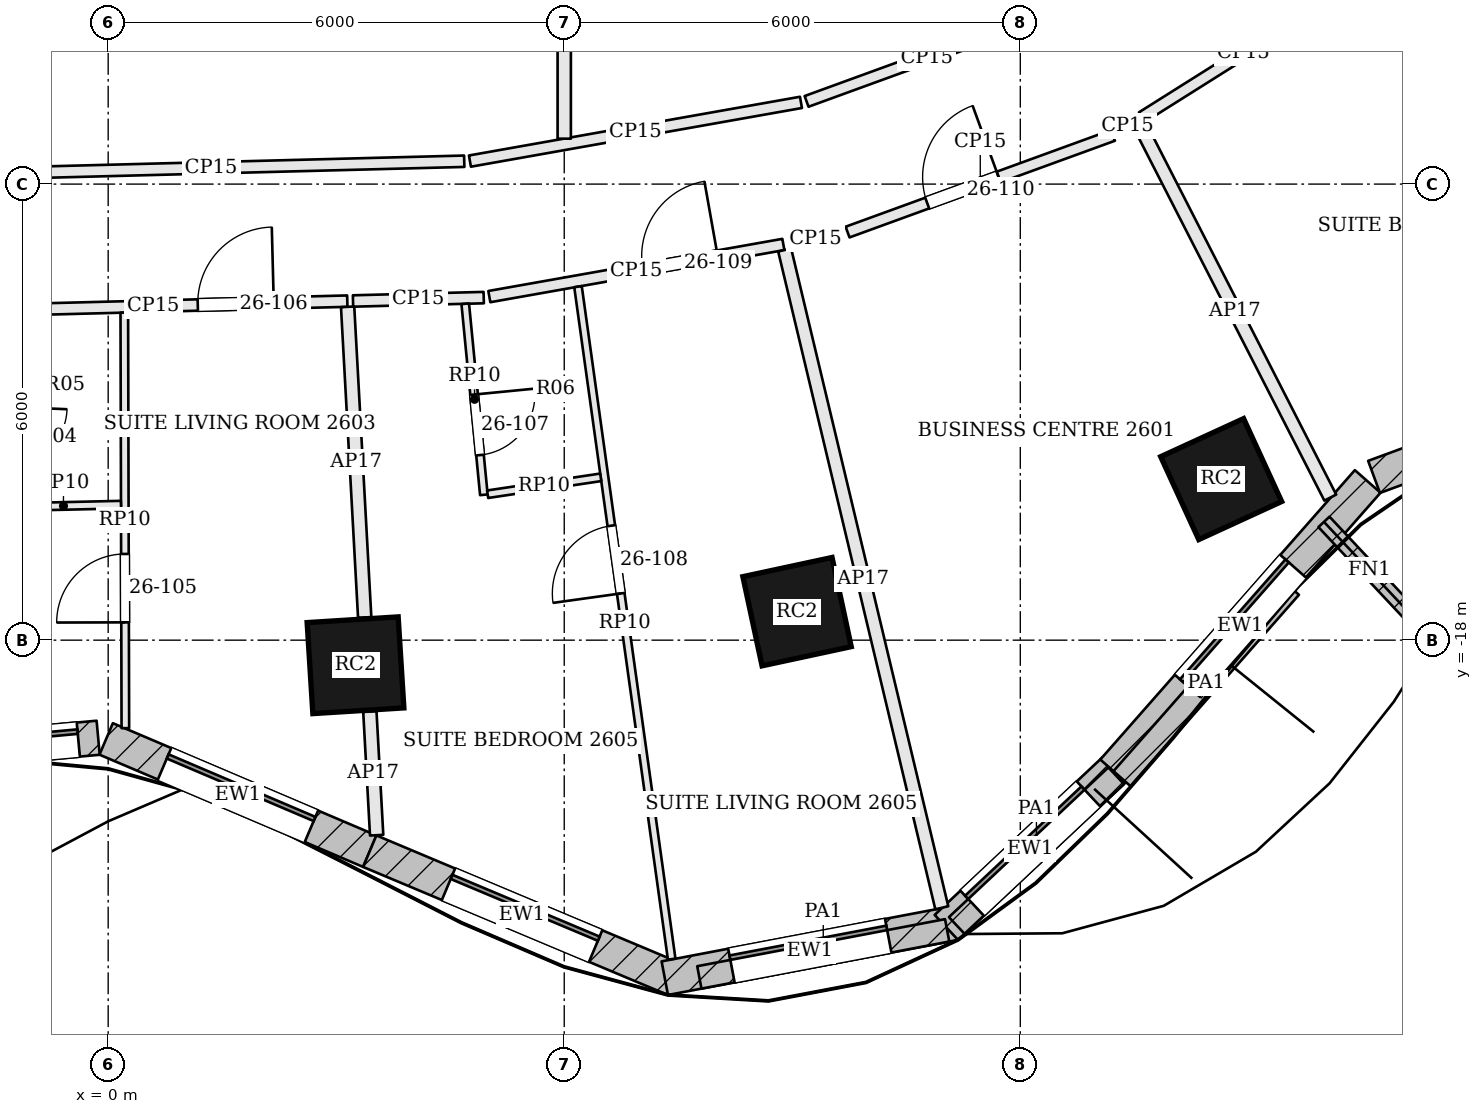
"""IFC4 building model, lengths in metres.
Left out: names, types, materials, properties, quantities, classifications, styles, units other than length and angle.
Written with IfcOpenShell. Run it as: python <this file> out.ifc"""

import sys

from ifc_helpers import new_model, si_unit, direction, frame, frame_2d, origin, origin_2d, place, context, subcontext, project, spatial, rectangle, extrude, element, fill, save


model = new_model("IFC4")
c1 = context("Model", 3, precision=1e-05, world=origin(), true_north=direction((0.0, 1.0)))
c2 = subcontext(c1, "Body", "Model", "MODEL_VIEW")
j1 = project(units=[si_unit("LENGTHUNIT", "METRE"), si_unit("PLANEANGLEUNIT", "RADIAN")], contexts=[c1])
p1 = place(None, origin())
s1 = spatial("IfcSite", under=j1, at=p1, CompositionType="ELEMENT")
p2 = place(p1, origin())
s2 = spatial("IfcBuilding", under=s1, at=p2, CompositionType="ELEMENT")
p3 = place(p2, frame((0.0, 0.0, 110.4)))
s3 = spatial("IfcBuildingStorey", under=s2, at=p3, CompositionType="ELEMENT", Elevation=110.4)
for number, where, z_axis, x_axis in (
    (1, (3.254, -18.33, 0.0), (0.0, 0.0, 1.0), (0.998, 0.063, 0.0)),
    (2, (9.063, -17.625, 0.0), (0.0, 0.0, 1.0), (0.978, 0.21, 0.0)),
    (3, (14.643, -15.881, 0.0), (0.0, 0.0, 1.0), (0.909, 0.417, 0.0)),
):
    element("IfcColumn", number, at=place(p3, frame(where, z_axis=z_axis, x_axis=x_axis)), inside=s3, PredefinedType="COLUMN", context=c2, shape_type="SweptSolid", body=[
        extrude(rectangle(XDim=1.2, YDim=1.2, at=origin_2d()), origin(), (0.0, 0.0, 1.0), 3.6),
    ])
p4 = place(p3, frame((-2.745, -19.525, 0.0), z_axis=(0.0, 0.0, 1.0), x_axis=(0.995768774275, 0.091894222771, 0.0)))
e4 = element("IfcWall", 4, at=p4, inside=s3, PredefinedType="SOLIDWALL", context=c2, shape_type="SweptSolid", body=[
    extrude(rectangle(XDim=2.625, YDim=0.45, at=frame_2d((1.312, 0.0))), origin(), (0.0, 0.0, 1.0), 3.4),
])
p5 = place(p4, frame((0.262, 0.0, 0.9)))
e5 = element("IfcOpeningElement", 5, at=p5, cuts=e4, PredefinedType="OPENING", context=c2, shape_type="SweptSolid", body=[
    extrude(rectangle(XDim=2.1, YDim=2.0, at=frame_2d((1.05, 1.0))), frame((0.0, 0.235, 0.0), z_axis=(0.0, -1.0, 0.0), x_axis=(1.0, 0.0, 0.0)), (0.0, 0.0, 1.0), 0.47),
])
p6 = place(p3, frame((-0.026, -19.299, 0.0), z_axis=(0.0, 0.0, 1.0), x_axis=(0.920040408927, -0.391823488245, 0.0)))
e6 = element("IfcWall", 6, at=p6, inside=s3, PredefinedType="SOLIDWALL", context=c2, shape_type="SweptSolid", body=[
    extrude(rectangle(XDim=3.77, YDim=0.45, at=frame_2d((1.885, 0.0))), origin(), (0.0, 0.0, 1.0), 3.4),
])
p7 = place(p6, frame((0.835, 0.0, 0.9)))
e7 = element("IfcOpeningElement", 7, at=p7, cuts=e6, PredefinedType="OPENING", context=c2, shape_type="SweptSolid", body=[
    extrude(rectangle(XDim=2.1, YDim=2.0, at=frame_2d((1.05, 1.0))), frame((0.0, 0.235, 0.0), z_axis=(0.0, -1.0, 0.0), x_axis=(1.0, 0.0, 0.0)), (0.0, 0.0, 1.0), 0.47),
])
p8 = place(p3, frame((3.441, -20.776, 0.0), z_axis=(0.0, 0.0, 1.0), x_axis=(0.921988121387, -0.387218160758, 0.0)))
e8 = element("IfcWall", 8, at=p8, inside=s3, PredefinedType="SOLIDWALL", context=c2, shape_type="SweptSolid", body=[
    extrude(rectangle(XDim=4.347, YDim=0.45, at=frame_2d((2.173, 0.0))), origin(), (0.0, 0.0, 1.0), 3.4),
])
p9 = place(p8, frame((1.123, 0.0, 0.9)))
e9 = element("IfcOpeningElement", 9, at=p9, cuts=e8, PredefinedType="OPENING", context=c2, shape_type="SweptSolid", body=[
    extrude(rectangle(XDim=2.1, YDim=2.0, at=frame_2d((1.05, 1.0))), frame((0.0, 0.235, 0.0), z_axis=(0.0, -1.0, 0.0), x_axis=(1.0, 0.0, 0.0)), (0.0, 0.0, 1.0), 0.47),
])
p10 = place(p3, frame((7.323, -22.447, 0.0), z_axis=(0.0, 0.0, 1.0), x_axis=(0.982420993638, 0.18667884524, 0.0)))
e10 = element("IfcWall", 10, at=p10, inside=s3, PredefinedType="SOLIDWALL", context=c2, shape_type="SweptSolid", body=[
    extrude(rectangle(XDim=3.884, YDim=0.45, at=frame_2d((1.942, 0.0))), origin(), (0.0, 0.0, 1.0), 3.4),
])
p11 = place(p10, frame((0.892, 0.0, 0.9)))
e11 = element("IfcOpeningElement", 11, at=p11, cuts=e10, PredefinedType="OPENING", context=c2, shape_type="SweptSolid", body=[
    extrude(rectangle(XDim=2.1, YDim=2.0, at=frame_2d((1.05, 1.0))), frame((0.0, 0.235, 0.0), z_axis=(0.0, -1.0, 0.0), x_axis=(1.0, 0.0, 0.0)), (0.0, 0.0, 1.0), 0.47),
])
p12 = place(p3, frame((11.027, -21.779, 0.0), z_axis=(0.0, 0.0, 1.0), x_axis=(0.728871214251, 0.684650825631, 0.0)))
e12 = element("IfcWall", 12, at=p12, inside=s3, PredefinedType="SOLIDWALL", context=c2, shape_type="SweptSolid", body=[
    extrude(rectangle(XDim=3.031, YDim=0.45, at=frame_2d((1.516, 0.0))), origin(), (0.0, 0.0, 1.0), 3.4),
])
p13 = place(p12, frame((0.466, 0.0, 0.9)))
e13 = element("IfcOpeningElement", 13, at=p13, cuts=e12, PredefinedType="OPENING", context=c2, shape_type="SweptSolid", body=[
    extrude(rectangle(XDim=2.1, YDim=2.0, at=frame_2d((1.05, 1.0))), frame((0.0, 0.235, 0.0), z_axis=(0.0, -1.0, 0.0), x_axis=(1.0, 0.0, 0.0)), (0.0, 0.0, 1.0), 0.47),
])
p14 = place(p3, frame((13.221, -19.719, 0.0), z_axis=(0.0, 0.0, 1.0), x_axis=(0.660424908916, 0.750892095899, 0.0)))
e14 = element("IfcWall", 14, at=p14, inside=s3, PredefinedType="SOLIDWALL", context=c2, shape_type="SweptSolid", body=[
    extrude(rectangle(XDim=5.071, YDim=0.45, at=frame_2d((2.535, 0.0))), origin(), (0.0, 0.0, 1.0), 3.4),
])
p15 = place(p14, frame((1.485, 0.0, 0.9)))
e15 = element("IfcOpeningElement", 15, at=p15, cuts=e14, PredefinedType="OPENING", context=c2, shape_type="SweptSolid", body=[
    extrude(rectangle(XDim=2.1, YDim=2.0, at=frame_2d((1.05, 1.0))), frame((0.0, 0.235, 0.0), z_axis=(0.0, -1.0, 0.0), x_axis=(1.0, 0.0, 0.0)), (0.0, 0.0, 1.0), 0.47),
])
p16 = place(p3, frame((16.654, -15.852, 0.0), z_axis=(0.0, 0.0, 1.0), x_axis=(0.938636568132, 0.344907803572, 0.0)))
e16 = element("IfcWall", 16, at=p16, inside=s3, PredefinedType="SOLIDWALL", context=c2, shape_type="SweptSolid", body=[
    extrude(rectangle(XDim=3.887, YDim=0.45, at=frame_2d((1.944, 0.0))), origin(), (0.0, 0.0, 1.0), 3.4),
])
p17 = place(p16, frame((0.894, 0.0, 0.9)))
e17 = element("IfcOpeningElement", 17, at=p17, cuts=e16, PredefinedType="OPENING", context=c2, shape_type="SweptSolid", body=[
    extrude(rectangle(XDim=2.1, YDim=2.0, at=frame_2d((1.05, 1.0))), frame((0.0, 0.235, 0.0), z_axis=(0.0, -1.0, 0.0), x_axis=(1.0, 0.0, 0.0)), (0.0, 0.0, 1.0), 0.47),
])
p18 = place(p3, frame((15.995, -16.444, 0.0), z_axis=(0.0, 0.0, 1.0), x_axis=(0.683852936488, -0.729619874494, 0.0)))
e18 = element("IfcWall", 18, at=p18, inside=s3, PredefinedType="SOLIDWALL", context=c2, shape_type="SweptSolid", body=[
    extrude(rectangle(XDim=1.75, YDim=0.2, at=frame_2d((0.875, 0.0))), origin(), (0.0, 0.0, 1.0), 3.4),
])
p19 = place(p3, frame((7.778, -22.437, 3.6), z_axis=(0.0, 0.0, 1.0), x_axis=(0.98241446716, 0.186713188382, 0.0)))
e19 = element("IfcWall", 19, at=p19, inside=s3, PredefinedType="PARAPET", context=c2, shape_type="SweptSolid", body=[
    extrude(rectangle(XDim=3.319, YDim=0.3, at=frame_2d((1.659, 0.0))), origin(), (0.0, 0.0, 1.0), 1.1),
])
p20 = place(p3, frame((11.164, -21.753, 3.6), z_axis=(0.0, 0.0, 1.0), x_axis=(0.72886475222, 0.684657704967, 0.0)))
e20 = element("IfcWall", 20, at=p20, inside=s3, PredefinedType="PARAPET", context=c2, shape_type="SweptSolid", body=[
    extrude(rectangle(XDim=2.877, YDim=0.3, at=frame_2d((1.438, 0.0))), origin(), (0.0, 0.0, 1.0), 1.1),
])
p21 = place(p3, frame((13.339, -19.822, 3.6), z_axis=(0.0, 0.0, 1.0), x_axis=(0.660445690116, 0.7508738179, 0.0)))
e21 = element("IfcWall", 21, at=p21, inside=s3, PredefinedType="PARAPET", context=c2, shape_type="SweptSolid", body=[
    extrude(rectangle(XDim=3.353, YDim=0.3, at=frame_2d((1.677, 0.0))), origin(), (0.0, 0.0, 1.0), 1.1),
])
p22 = place(p3, frame((-1.957, -13.672, 0.0), z_axis=(0.0, 0.0, 1.0), x_axis=(0.999663973177, 0.025921819609, 0.0)))
e22 = element("IfcWall", 22, at=p22, inside=s3, PredefinedType="PARTITIONING", context=c2, shape_type="SweptSolid", body=[
    extrude(rectangle(XDim=5.105, YDim=0.15, at=frame_2d((2.552, 0.0))), origin(), (0.0, 0.0, 1.0), 2.784),
])
p23 = place(p22, frame((3.137, 0.0, 0.0)))
e23 = element("IfcOpeningElement", 23, at=p23, cuts=e22, PredefinedType="OPENING", context=c2, shape_type="SweptSolid", body=[
    extrude(rectangle(XDim=1.0, YDim=2.1, at=frame_2d((0.5, 1.05))), frame((0.0, 0.085, 0.0), z_axis=(0.0, -1.0, 0.0), x_axis=(1.0, 0.0, 0.0)), (0.0, 0.0, 1.0), 0.17),
])
p24 = place(p3, frame((3.532, -20.566, 0.0), z_axis=(0.0, 0.0, 1.0), x_axis=(-0.054855735566, 0.998494290557, 0.0)))
e24 = element("IfcWall", 24, at=p24, inside=s3, PredefinedType="PARTITIONING", context=c2, shape_type="SweptSolid", body=[
    extrude(rectangle(XDim=1.629, YDim=0.175, at=frame_2d((0.814, 0.0))), origin(), (0.0, 0.0, 1.0), 2.784),
])
p25 = place(p3, frame((3.375, -17.701, 0.0), z_axis=(0.0, 0.0, 1.0), x_axis=(-0.054881910862, 0.998492852183, 0.0)))
e25 = element("IfcWall", 25, at=p25, inside=s3, PredefinedType="PARTITIONING", context=c2, shape_type="SweptSolid", body=[
    extrude(rectangle(XDim=4.093, YDim=0.175, at=frame_2d((2.046, 0.0))), origin(), (0.0, 0.0, 1.0), 2.784),
])
p26 = place(p3, frame((3.221, -13.538, 0.0), z_axis=(0.0, 0.0, 1.0), x_axis=(0.999666376444, 0.025828972248, 0.0)))
e26 = element("IfcWall", 26, at=p26, inside=s3, PredefinedType="PARTITIONING", context=c2, shape_type="SweptSolid", body=[
    extrude(rectangle(XDim=1.72, YDim=0.15, at=frame_2d((0.86, 0.0))), origin(), (0.0, 0.0, 1.0), 2.784),
])
p27 = place(p3, frame((5.015, -13.48, 0.0), z_axis=(0.0, 0.0, 1.0), x_axis=(0.984634298251, 0.174629031689, 0.0)))
e27 = element("IfcWall", 27, at=p27, inside=s3, PredefinedType="PARTITIONING", context=c2, shape_type="SweptSolid", body=[
    extrude(rectangle(XDim=3.928, YDim=0.15, at=frame_2d((1.964, 0.0))), origin(), (0.0, 0.0, 1.0), 2.784),
])
p28 = place(p27, frame((2.051, 0.0, 0.0)))
e28 = element("IfcOpeningElement", 28, at=p28, cuts=e27, PredefinedType="OPENING", context=c2, shape_type="SweptSolid", body=[
    extrude(rectangle(XDim=1.0, YDim=2.1, at=frame_2d((0.5, 1.05))), frame((0.0, 0.085, 0.0), z_axis=(0.0, -1.0, 0.0), x_axis=(1.0, 0.0, 0.0)), (0.0, 0.0, 1.0), 0.17),
])
p29 = place(p3, frame((10.967, -21.521, 0.0), z_axis=(0.0, 0.0, 1.0), x_axis=(-0.232333962302, 0.972636072723, 0.0)))
e29 = element("IfcWall", 29, at=p29, inside=s3, PredefinedType="PARTITIONING", context=c2, shape_type="SweptSolid", body=[
    extrude(rectangle(XDim=8.897, YDim=0.175, at=frame_2d((4.449, 0.0))), origin(), (0.0, 0.0, 1.0), 2.784),
])
p30 = place(p3, frame((8.957, -12.781, 0.0), z_axis=(0.0, 0.0, 1.0), x_axis=(0.984683194841, 0.17435310665, 0.0)))
e30 = element("IfcWall", 30, at=p30, inside=s3, PredefinedType="PARTITIONING", context=c2, shape_type="SweptSolid", body=[
    extrude(rectangle(XDim=0.711, YDim=0.15, at=frame_2d((0.356, 0.0))), origin(), (0.0, 0.0, 1.0), 2.784),
])
p31 = place(p3, frame((9.728, -12.631, 0.0), z_axis=(0.0, 0.0, 1.0), x_axis=(0.939626438181, 0.342201923826, 0.0)))
e31 = element("IfcWall", 31, at=p31, inside=s3, PredefinedType="PARTITIONING", context=c2, shape_type="SweptSolid", body=[
    extrude(rectangle(XDim=3.716, YDim=0.15, at=frame_2d((1.858, 0.0))), origin(), (0.0, 0.0, 1.0), 2.784),
])
p32 = place(p31, frame((1.115, 0.0, 0.0)))
e32 = element("IfcOpeningElement", 32, at=p32, cuts=e31, PredefinedType="OPENING", context=c2, shape_type="SweptSolid", body=[
    extrude(rectangle(XDim=1.0, YDim=2.1, at=frame_2d((0.5, 1.05))), frame((0.0, 0.085, 0.0), z_axis=(0.0, -1.0, 0.0), x_axis=(1.0, 0.0, 0.0)), (0.0, 0.0, 1.0), 0.17),
])
p33 = place(p3, frame((13.283, -11.319, 0.0), z_axis=(0.0, 0.0, 1.0), x_axis=(0.846490250249, 0.532404222592, 0.0)))
e33 = element("IfcWall", 33, at=p33, inside=s3, PredefinedType="PARTITIONING", context=c2, shape_type="SweptSolid", body=[
    extrude(rectangle(XDim=0.301, YDim=0.15, at=frame_2d((0.15, 0.0))), origin(), (0.0, 0.0, 1.0), 2.784),
])
p34 = place(p3, frame((16.078, -16.125, 0.0), z_axis=(0.0, 0.0, 1.0), x_axis=(-0.455535500666, 0.890217618132, 0.0)))
e34 = element("IfcWall", 34, at=p34, inside=s3, PredefinedType="PARTITIONING", context=c2, shape_type="SweptSolid", body=[
    extrude(rectangle(XDim=5.502, YDim=0.175, at=frame_2d((2.751, 0.0))), origin(), (0.0, 0.0, 1.0), 2.784),
])
p35 = place(p3, frame((13.601, -11.119, 0.0), z_axis=(0.0, 0.0, 1.0), x_axis=(0.846302624213, 0.532702419978, 0.0)))
e35 = element("IfcWall", 35, at=p35, inside=s3, PredefinedType="PARTITIONING", context=c2, shape_type="SweptSolid", body=[
    extrude(rectangle(XDim=3.155, YDim=0.15, at=frame_2d((1.577, 0.0))), origin(), (0.0, 0.0, 1.0), 2.784),
])
p36 = place(p3, frame((12.353, -9.76, 0.0), z_axis=(0.0, 0.0, 1.0), x_axis=(-0.939632450309, -0.342185415127, 0.0)))
e36 = element("IfcWall", 36, at=p36, inside=s3, PredefinedType="PARTITIONING", context=c2, shape_type="SweptSolid", body=[
    extrude(rectangle(XDim=3.368, YDim=0.15, at=frame_2d((1.684, 0.0))), origin(), (0.0, 0.0, 1.0), 2.784),
])
p37 = place(p3, frame((9.115, -10.925, 0.0), z_axis=(0.0, 0.0, 1.0), x_axis=(-0.984632605417, -0.174638576352, 0.0)))
e37 = element("IfcWall", 37, at=p37, inside=s3, PredefinedType="PARTITIONING", context=c2, shape_type="SweptSolid", body=[
    extrude(rectangle(XDim=4.423, YDim=0.15, at=frame_2d((2.211, 0.0))), origin(), (0.0, 0.0, 1.0), 2.784),
])
p38 = place(p3, frame((4.684, -11.699, 0.0), z_axis=(0.0, 0.0, 1.0), x_axis=(-0.999663438204, -0.025942442425, 0.0)))
e38 = element("IfcWall", 38, at=p38, inside=s3, PredefinedType="PARTITIONING", context=c2, shape_type="SweptSolid", body=[
    extrude(rectangle(XDim=6.663, YDim=0.15, at=frame_2d((3.332, 0.0))), origin(), (0.0, 0.0, 1.0), 2.784),
])
p39 = place(p3, frame((0.226, -19.158, 0.0), z_axis=(0.0, 0.0, 1.0), x_axis=(-0.002545543736, 0.999996760098, 0.0)))
e39 = element("IfcWall", 39, at=p39, inside=s3, PredefinedType="PARTITIONING", context=c2, shape_type="SweptSolid", body=[
    extrude(rectangle(XDim=5.467, YDim=0.1, at=frame_2d((2.733, 0.0))), origin(), (0.0, 0.0, 1.0), 2.884),
])
p40 = place(p39, frame((1.392, 0.0, 0.0)))
e40 = element("IfcOpeningElement", 40, at=p40, cuts=e39, PredefinedType="OPENING", context=c2, shape_type="SweptSolid", body=[
    extrude(rectangle(XDim=0.9, YDim=2.4, at=frame_2d((0.45, 1.2))), frame((0.0, 0.06, 0.0), z_axis=(0.0, -1.0, 0.0), x_axis=(1.0, 0.0, 0.0)), (0.0, 0.0, 1.0), 0.12),
])
p41 = place(p3, frame((-1.345, -16.251, 0.0), z_axis=(0.0, 0.0, 1.0), x_axis=(0.999741502451, 0.022736056749, 0.0)))
e41 = element("IfcWall", 41, at=p41, inside=s3, PredefinedType="PARTITIONING", context=c2, shape_type="SweptSolid", body=[
    extrude(rectangle(XDim=1.514, YDim=0.1, at=frame_2d((0.757, 0.0))), origin(), (0.0, 0.0, 1.0), 2.884),
])
p42 = place(p3, frame((7.414, -22.196, 0.0), z_axis=(0.0, 0.0, 1.0), x_axis=(-0.13798028852, 0.99043497514, 0.0)))
e42 = element("IfcWall", 42, at=p42, inside=s3, PredefinedType="PARTITIONING", context=c2, shape_type="SweptSolid", body=[
    extrude(rectangle(XDim=8.932, YDim=0.1, at=frame_2d((4.466, 0.0))), origin(), (0.0, 0.0, 1.0), 2.884),
])
p43 = place(p42, frame((4.857, 0.0, 0.0)))
e43 = element("IfcOpeningElement", 43, at=p43, cuts=e42, PredefinedType="OPENING", context=c2, shape_type="SweptSolid", body=[
    extrude(rectangle(XDim=0.9, YDim=2.4, at=frame_2d((0.45, 1.2))), frame((0.0, 0.06, 0.0), z_axis=(0.0, -1.0, 0.0), x_axis=(1.0, 0.0, 0.0)), (0.0, 0.0, 1.0), 0.12),
])
p44 = place(p3, frame((4.698, -13.574, 0.0), z_axis=(0.0, 0.0, 1.0), x_axis=(0.097081274937, -0.9952764571, 0.0)))
e44 = element("IfcWall", 44, at=p44, inside=s3, PredefinedType="PARTITIONING", context=c2, shape_type="SweptSolid", body=[
    extrude(rectangle(XDim=2.525, YDim=0.1, at=frame_2d((1.262, 0.0))), origin(), (0.0, 0.0, 1.0), 2.884),
])
p45 = place(p44, frame((1.2, 0.0, 0.0)))
e45 = element("IfcOpeningElement", 45, at=p45, cuts=e44, PredefinedType="OPENING", context=c2, shape_type="SweptSolid", body=[
    extrude(rectangle(XDim=0.8, YDim=2.1, at=frame_2d((0.4, 1.05))), frame((0.0, 0.06, 0.0), z_axis=(0.0, -1.0, 0.0), x_axis=(1.0, 0.0, 0.0)), (0.0, 0.0, 1.0), 0.12),
])
p46 = place(p3, frame((4.992, -16.08, 0.0), z_axis=(0.0, 0.0, 1.0), x_axis=(0.989010035821, 0.147848398857, 0.0)))
e46 = element("IfcWall", 46, at=p46, inside=s3, PredefinedType="PARTITIONING", context=c2, shape_type="SweptSolid", body=[
    extrude(rectangle(XDim=1.504, YDim=0.1, at=frame_2d((0.752, 0.0))), origin(), (0.0, 0.0, 1.0), 2.884),
])
p47 = place(p3, frame((6.0, -11.402, 0.0), z_axis=(0.0, 0.0, 1.0), x_axis=(0.0, 1.0, 0.0)))
e47 = element("IfcWall", 47, at=p47, inside=s3, PredefinedType="PARTITIONING", context=c2, shape_type="SweptSolid", body=[
    extrude(rectangle(XDim=6.527, YDim=0.175, at=frame_2d((3.264, 0.0))), origin(), (0.0, 0.0, 1.0), 2.784),
])
p48 = place(p5, origin())
e48 = element("IfcWindow", 48, at=p48, inside=s3, PartitioningType="SINGLE_PANEL", PredefinedType="WINDOW", context=c2, shape_type="SweptSolid", body=[
    extrude(rectangle(XDim=2.1, YDim=2.0, at=frame_2d((1.05, 1.0))), frame((0.0, 0.135, 0.0), z_axis=(0.0, -1.0, 0.0), x_axis=(1.0, 0.0, 0.0)), (0.0, 0.0, 1.0), 0.06),
])
fill(e5, e48)
p49 = place(p7, origin())
e49 = element("IfcWindow", 49, at=p49, inside=s3, PartitioningType="SINGLE_PANEL", PredefinedType="WINDOW", context=c2, shape_type="SweptSolid", body=[
    extrude(rectangle(XDim=2.1, YDim=2.0, at=frame_2d((1.05, 1.0))), frame((0.0, 0.135, 0.0), z_axis=(0.0, -1.0, 0.0), x_axis=(1.0, 0.0, 0.0)), (0.0, 0.0, 1.0), 0.06),
])
fill(e7, e49)
p50 = place(p9, origin())
e50 = element("IfcWindow", 50, at=p50, inside=s3, PartitioningType="SINGLE_PANEL", PredefinedType="WINDOW", context=c2, shape_type="SweptSolid", body=[
    extrude(rectangle(XDim=2.1, YDim=2.0, at=frame_2d((1.05, 1.0))), frame((0.0, 0.135, 0.0), z_axis=(0.0, -1.0, 0.0), x_axis=(1.0, 0.0, 0.0)), (0.0, 0.0, 1.0), 0.06),
])
fill(e9, e50)
p51 = place(p11, origin())
e51 = element("IfcWindow", 51, at=p51, inside=s3, PartitioningType="SINGLE_PANEL", PredefinedType="WINDOW", context=c2, shape_type="SweptSolid", body=[
    extrude(rectangle(XDim=2.1, YDim=2.0, at=frame_2d((1.05, 1.0))), frame((0.0, 0.135, 0.0), z_axis=(0.0, -1.0, 0.0), x_axis=(1.0, 0.0, 0.0)), (0.0, 0.0, 1.0), 0.06),
])
fill(e11, e51)
p52 = place(p13, origin())
e52 = element("IfcWindow", 52, at=p52, inside=s3, PartitioningType="SINGLE_PANEL", PredefinedType="WINDOW", context=c2, shape_type="SweptSolid", body=[
    extrude(rectangle(XDim=2.1, YDim=2.0, at=frame_2d((1.05, 1.0))), frame((0.0, 0.135, 0.0), z_axis=(0.0, -1.0, 0.0), x_axis=(1.0, 0.0, 0.0)), (0.0, 0.0, 1.0), 0.06),
])
fill(e13, e52)
p53 = place(p15, origin())
e53 = element("IfcWindow", 53, at=p53, inside=s3, PartitioningType="SINGLE_PANEL", PredefinedType="WINDOW", context=c2, shape_type="SweptSolid", body=[
    extrude(rectangle(XDim=2.1, YDim=2.0, at=frame_2d((1.05, 1.0))), frame((0.0, 0.135, 0.0), z_axis=(0.0, -1.0, 0.0), x_axis=(1.0, 0.0, 0.0)), (0.0, 0.0, 1.0), 0.06),
])
fill(e15, e53)
p54 = place(p40, origin())
e54 = element("IfcDoor", 54, at=p54, inside=s3, OperationType="SINGLE_SWING_LEFT", PredefinedType="DOOR", context=c2, shape_type="SweptSolid", body=[
    extrude(rectangle(XDim=0.9, YDim=2.4, at=frame_2d((0.45, 1.2))), frame((0.0, 0.025, 0.0), z_axis=(0.0, -1.0, 0.0), x_axis=(1.0, 0.0, 0.0)), (0.0, 0.0, 1.0), 0.05),
])
fill(e40, e54)
p55 = place(p23, origin())
e55 = element("IfcDoor", 55, at=p55, inside=s3, OperationType="SINGLE_SWING_RIGHT", PredefinedType="DOOR", context=c2, shape_type="SweptSolid", body=[
    extrude(rectangle(XDim=1.0, YDim=2.1, at=frame_2d((0.5, 1.05))), frame((0.0, 0.025, 0.0), z_axis=(0.0, -1.0, 0.0), x_axis=(1.0, 0.0, 0.0)), (0.0, 0.0, 1.0), 0.05),
])
fill(e23, e55)
p56 = place(p45, origin())
e56 = element("IfcDoor", 56, at=p56, inside=s3, OperationType="SINGLE_SWING_LEFT", PredefinedType="DOOR", context=c2, shape_type="SweptSolid", body=[
    extrude(rectangle(XDim=0.8, YDim=2.1, at=frame_2d((0.4, 1.05))), frame((0.0, 0.025, 0.0), z_axis=(0.0, -1.0, 0.0), x_axis=(1.0, 0.0, 0.0)), (0.0, 0.0, 1.0), 0.05),
])
fill(e45, e56)
p57 = place(p43, origin())
e57 = element("IfcDoor", 57, at=p57, inside=s3, OperationType="SINGLE_SWING_LEFT", PredefinedType="DOOR", context=c2, shape_type="SweptSolid", body=[
    extrude(rectangle(XDim=0.9, YDim=2.4, at=frame_2d((0.45, 1.2))), frame((0.0, 0.025, 0.0), z_axis=(0.0, -1.0, 0.0), x_axis=(1.0, 0.0, 0.0)), (0.0, 0.0, 1.0), 0.05),
])
fill(e43, e57)
p58 = place(p28, origin())
e58 = element("IfcDoor", 58, at=p58, inside=s3, OperationType="SINGLE_SWING_RIGHT", PredefinedType="DOOR", context=c2, shape_type="SweptSolid", body=[
    extrude(rectangle(XDim=1.0, YDim=2.1, at=frame_2d((0.5, 1.05))), frame((0.0, 0.025, 0.0), z_axis=(0.0, -1.0, 0.0), x_axis=(1.0, 0.0, 0.0)), (0.0, 0.0, 1.0), 0.05),
])
fill(e28, e58)
p59 = place(p32, origin())
e59 = element("IfcDoor", 59, at=p59, inside=s3, OperationType="SINGLE_SWING_RIGHT", PredefinedType="DOOR", context=c2, shape_type="SweptSolid", body=[
    extrude(rectangle(XDim=1.0, YDim=2.1, at=frame_2d((0.5, 1.05))), frame((0.0, 0.025, 0.0), z_axis=(0.0, -1.0, 0.0), x_axis=(1.0, 0.0, 0.0)), (0.0, 0.0, 1.0), 0.05),
])
fill(e32, e59)
save(model, sys.argv[1])
